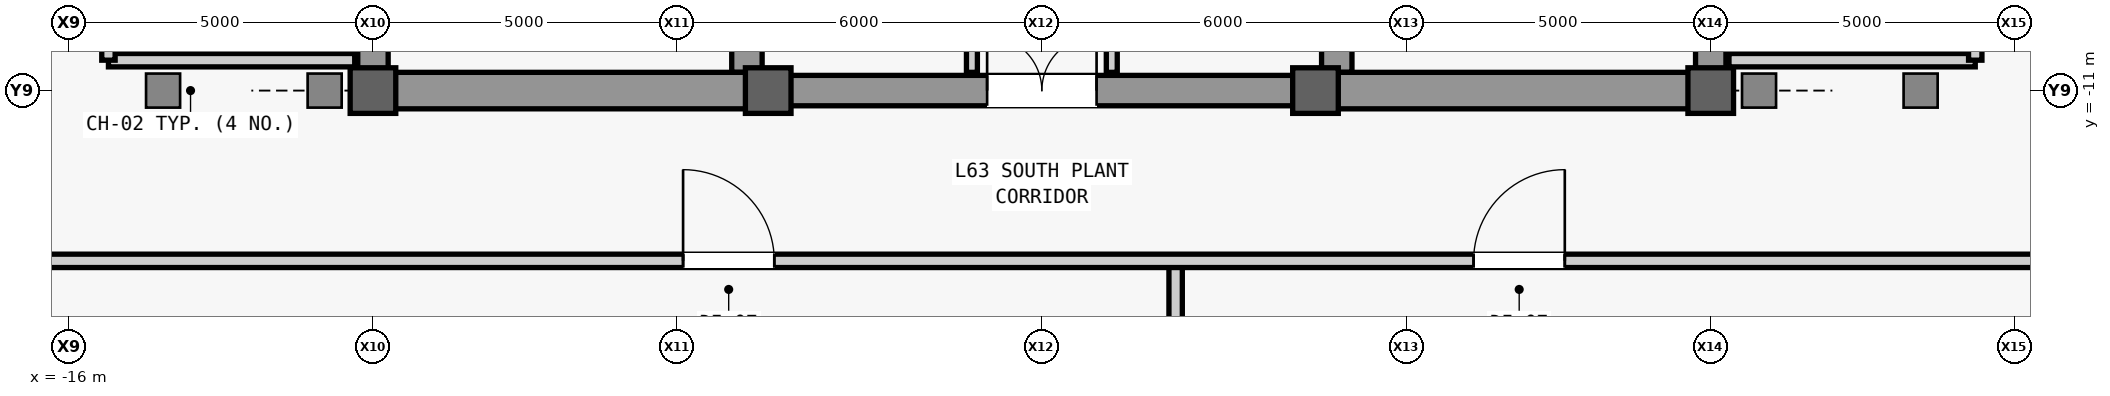
"""IFC4 building model, lengths in metres.
Left out: names, types, materials, properties, quantities, classifications, styles, units other than length and angle.
Written with IfcOpenShell. Run it as: python <this file> out.ifc"""

import sys

from ifc_helpers import new_model, si_unit, direction, frame, frame_2d, origin, origin_2d, place, context, subcontext, project, spatial, rectangle, extrude, source, transform, mapped, element, fill, save


model = new_model("IFC4")
c1 = context("Model", 3, precision=1e-05, world=origin(), true_north=direction((0.0, 1.0)))
c2 = subcontext(c1, "Body", "Model", "MODEL_VIEW")
j1 = project(units=[si_unit("LENGTHUNIT", "METRE"), si_unit("PLANEANGLEUNIT", "RADIAN")], contexts=[c1])
p1 = place(None, origin())
s1 = spatial("IfcSite", under=j1, at=p1, CompositionType="ELEMENT")
p2 = place(p1, origin())
s2 = spatial("IfcBuilding", under=s1, at=p2, CompositionType="ELEMENT")
p3 = place(p2, frame((0.0, 0.0, 268.3)))
s3 = spatial("IfcBuildingStorey", under=s2, at=p3, CompositionType="ELEMENT", Elevation=268.3)
m1 = source(origin(), c2, "Body", "SweptSolid", [
    extrude(rectangle(XDim=22.0, YDim=0.5, at=frame_2d((11.0, 0.0))), origin(), (0.0, 0.0, 1.0), 4.98),
])
p4 = place(p3, frame((-11.0, -11.0, 0.0), z_axis=(0.0, 0.0, 1.0), x_axis=(0.0, 1.0, 0.0)))
e1 = element("IfcWall", 1, at=p4, inside=s3, PredefinedType="SHEAR", context=c2, shape_type="MappedRepresentation", body=[
    mapped(m1, transform((0.0, 0.0, 0.0), scale=1.0)),
])
m2 = source(origin(), c2, "Body", "SweptSolid", [
    extrude(rectangle(XDim=1.1, YDim=2.2, at=frame_2d((0.55, 1.1))), frame((0.0, 0.26, 0.0), z_axis=(0.0, -1.0, 0.0), x_axis=(1.0, 0.0, 0.0)), (0.0, 0.0, 1.0), 0.52),
])
p5 = place(p4, frame((0.8, 0.0, 0.0)))
e2 = element("IfcOpeningElement", 2, at=p5, cuts=e1, PredefinedType="OPENING", context=c2, shape_type="MappedRepresentation", body=[
    mapped(m2, transform((0.0, 0.0, 0.0), scale=1.0)),
])
p6 = place(p4, frame((12.5, 0.0, 0.0)))
e3 = element("IfcOpeningElement", 3, at=p6, cuts=e1, PredefinedType="OPENING", context=c2, shape_type="MappedRepresentation", body=[
    mapped(m2, transform((0.0, 0.0, 0.0), scale=1.0)),
])
m3 = source(origin(), c2, "Body", "SweptSolid", [
    extrude(rectangle(XDim=0.9, YDim=2.15, at=frame_2d((0.45, 1.075))), frame((0.0, 0.26, 0.0), z_axis=(0.0, -1.0, 0.0), x_axis=(1.0, 0.0, 0.0)), (0.0, 0.0, 1.0), 0.52),
])
p7 = place(p4, frame((7.575, 0.0, 0.0)))
e4 = element("IfcOpeningElement", 4, at=p7, cuts=e1, PredefinedType="OPENING", context=c2, shape_type="MappedRepresentation", body=[
    mapped(m3, transform((0.0, 0.0, 0.0), scale=1.0)),
])
m4 = source(origin(), c2, "Body", "SweptSolid", [
    extrude(rectangle(XDim=1.3, YDim=2.3, at=frame_2d((0.65, 1.15))), frame((0.0, 0.26, 0.0), z_axis=(0.0, -1.0, 0.0), x_axis=(1.0, 0.0, 0.0)), (0.0, 0.0, 1.0), 0.52),
])
p8 = place(p4, frame((2.7, 0.0, 0.0)))
e5 = element("IfcOpeningElement", 5, at=p8, cuts=e1, PredefinedType="OPENING", context=c2, shape_type="MappedRepresentation", body=[
    mapped(m4, transform((0.0, 0.0, 0.0), scale=1.0)),
])
p9 = place(p3, frame((11.0, -11.0, 0.0), z_axis=(0.0, 0.0, 1.0), x_axis=(0.0, 1.0, 0.0)))
e6 = element("IfcWall", 6, at=p9, inside=s3, PredefinedType="SHEAR", context=c2, shape_type="MappedRepresentation", body=[
    mapped(m1, transform((0.0, 0.0, 0.0), scale=1.0)),
])
p10 = place(p9, frame((0.8, 0.0, 0.0)))
e7 = element("IfcOpeningElement", 7, at=p10, cuts=e6, PredefinedType="OPENING", context=c2, shape_type="MappedRepresentation", body=[
    mapped(m2, transform((0.0, 0.0, 0.0), scale=1.0)),
])
p11 = place(p9, frame((7.575, 0.0, 0.0)))
e8 = element("IfcOpeningElement", 8, at=p11, cuts=e6, PredefinedType="OPENING", context=c2, shape_type="MappedRepresentation", body=[
    mapped(m3, transform((0.0, 0.0, 0.0), scale=1.0)),
])
p12 = place(p9, frame((2.7, 0.0, 0.0)))
e9 = element("IfcOpeningElement", 9, at=p12, cuts=e6, PredefinedType="OPENING", context=c2, shape_type="MappedRepresentation", body=[
    mapped(m4, transform((0.0, 0.0, 0.0), scale=1.0)),
])
p13 = place(p9, frame((13.35, 0.0, 0.0)))
e10 = element("IfcOpeningElement", 10, at=p13, cuts=e6, PredefinedType="OPENING", context=c2, shape_type="MappedRepresentation", body=[
    mapped(m4, transform((0.0, 0.0, 0.0), scale=1.0)),
])
m5 = source(origin(), c2, "Body", "SweptSolid", [
    extrude(rectangle(XDim=21.4, YDim=0.5, at=frame_2d((10.7, 0.0))), origin(), (0.0, 0.0, 1.0), 4.98),
])
for number, where, z_axis, x_axis in (
    (11, (-4.85, -10.7, 0.0), (0.0, 0.0, 1.0), (0.0, 1.0, 0.0)),
    (12, (4.85, -10.7, 0.0), (0.0, 0.0, 1.0), (0.0, 1.0, 0.0)),
):
    element("IfcWall", number, at=place(p3, frame(where, z_axis=z_axis, x_axis=x_axis)), inside=s3, PredefinedType="SHEAR", context=c2, shape_type="MappedRepresentation", body=[
        mapped(m5, transform((0.0, 0.0, 0.0), scale=1.0)),
    ])
m6 = source(origin(), c2, "Body", "SweptSolid", [
    extrude(rectangle(XDim=5.9, YDim=0.6, at=frame_2d((2.95, 0.0))), origin(), (0.0, 0.0, 1.0), 4.98),
])
for number, where, z_axis, x_axis in (
    (13, (-10.75, -11.0, 0.0), (0.0, 0.0, 1.0), (1.0, 0.0, 0.0)),
    (14, (4.85, -11.0, 0.0), (0.0, 0.0, 1.0), (1.0, 0.0, 0.0)),
):
    element("IfcWall", number, at=place(p3, frame(where, z_axis=z_axis, x_axis=x_axis)), inside=s3, PredefinedType="SHEAR", context=c2, shape_type="MappedRepresentation", body=[
        mapped(m6, transform((0.0, 0.0, 0.0), scale=1.0)),
    ])
m7 = source(origin(), c2, "Body", "SweptSolid", [
    extrude(rectangle(XDim=9.2, YDim=0.5, at=frame_2d((4.6, 0.0))), origin(), (0.0, 0.0, 1.0), 4.98),
])
p14 = place(p3, frame((-4.6, -11.0, 0.0), z_axis=(0.0, 0.0, 1.0), x_axis=(1.0, 0.0, 0.0)))
e15 = element("IfcWall", 15, at=p14, inside=s3, PredefinedType="SHEAR", context=c2, shape_type="MappedRepresentation", body=[
    mapped(m7, transform((0.0, 0.0, 0.0), scale=1.0)),
])
m8 = source(origin(), c2, "Body", "SweptSolid", [
    extrude(rectangle(XDim=1.8, YDim=2.25, at=frame_2d((0.9, 1.125))), frame((0.0, 0.26, 0.0), z_axis=(0.0, -1.0, 0.0), x_axis=(1.0, 0.0, 0.0)), (0.0, 0.0, 1.0), 0.52),
])
p15 = place(p14, frame((3.7, 0.0, 0.0)))
e16 = element("IfcOpeningElement", 16, at=p15, cuts=e15, PredefinedType="OPENING", context=c2, shape_type="MappedRepresentation", body=[
    mapped(m8, transform((0.0, 0.0, 0.0), scale=1.0)),
])
m9 = source(origin(), c2, "Body", "SweptSolid", [
    extrude(rectangle(XDim=0.75, YDim=0.75, at=origin_2d()), origin(), (0.0, 0.0, 1.0), 5.2),
])
for number, where, z_axis, x_axis in (
    (17, (-11.0, -11.0, 0.0), (0.0, 0.0, 1.0), (1.0, 0.0, 0.0)),
    (18, (-4.5, -11.0, 0.0), (0.0, 0.0, 1.0), (1.0, 0.0, 0.0)),
    (19, (4.5, -11.0, 0.0), (0.0, 0.0, 1.0), (1.0, 0.0, 0.0)),
    (20, (11.0, -11.0, 0.0), (0.0, 0.0, 1.0), (1.0, 0.0, 0.0)),
):
    element("IfcColumn", number, at=place(p3, frame(where, z_axis=z_axis, x_axis=x_axis)), inside=s3, PredefinedType="COLUMN", context=c2, shape_type="MappedRepresentation", body=[
        mapped(m9, transform((0.0, 0.0, 0.0), scale=1.0)),
    ])
m10 = source(origin(), c2, "Body", "SweptSolid", [
    extrude(rectangle(XDim=4.05, YDim=0.22, at=frame_2d((2.025, 0.0))), origin(), (0.0, 0.0, 1.0), 4.98),
])
p16 = place(p3, frame((-15.35, -10.5, 0.0), z_axis=(0.0, 0.0, 1.0), x_axis=(1.0, 0.0, 0.0)))
e21 = element("IfcWall", 21, at=p16, inside=s3, PredefinedType="PARTITIONING", context=c2, shape_type="MappedRepresentation", body=[
    mapped(m10, transform((0.0, 0.0, 0.0), scale=1.0)),
])
m11 = source(origin(), c2, "Body", "SweptSolid", [
    extrude(rectangle(XDim=4.4, YDim=0.22, at=frame_2d((2.2, 0.0))), origin(), (0.0, 0.0, 1.0), 4.98),
])
p17 = place(p3, frame((-15.35, -10.5, 0.0), z_axis=(0.0, 0.0, 1.0), x_axis=(0.0, 1.0, 0.0)))
e22 = element("IfcWall", 22, at=p17, inside=s3, PredefinedType="PARTITIONING", context=c2, shape_type="MappedRepresentation", body=[
    mapped(m11, transform((0.0, 0.0, 0.0), scale=1.0)),
])
m12 = source(origin(), c2, "Body", "SweptSolid", [
    extrude(rectangle(XDim=1.2, YDim=2.2, at=frame_2d((0.6, 1.1))), frame((0.0, 0.12, 0.0), z_axis=(0.0, -1.0, 0.0), x_axis=(1.0, 0.0, 0.0)), (0.0, 0.0, 1.0), 0.24),
])
p18 = place(p17, frame((1.6, 0.0, 0.0)))
e23 = element("IfcOpeningElement", 23, at=p18, cuts=e22, PredefinedType="OPENING", context=c2, shape_type="MappedRepresentation", body=[
    mapped(m12, transform((0.0, 0.0, 0.0), scale=1.0)),
])
p19 = place(p3, frame((11.3, -10.5, 0.0), z_axis=(0.0, 0.0, 1.0), x_axis=(1.0, 0.0, 0.0)))
e24 = element("IfcWall", 24, at=p19, inside=s3, PredefinedType="PARTITIONING", context=c2, shape_type="MappedRepresentation", body=[
    mapped(m10, transform((0.0, 0.0, 0.0), scale=1.0)),
])
p20 = place(p3, frame((15.35, -10.5, 0.0), z_axis=(0.0, 0.0, 1.0), x_axis=(0.0, 1.0, 0.0)))
e25 = element("IfcWall", 25, at=p20, inside=s3, PredefinedType="PARTITIONING", context=c2, shape_type="MappedRepresentation", body=[
    mapped(m11, transform((0.0, 0.0, 0.0), scale=1.0)),
])
p21 = place(p20, frame((1.6, 0.0, 0.0)))
e26 = element("IfcOpeningElement", 26, at=p21, cuts=e25, PredefinedType="OPENING", context=c2, shape_type="MappedRepresentation", body=[
    mapped(m12, transform((0.0, 0.0, 0.0), scale=1.0)),
])
m13 = source(origin(), c2, "Body", "SweptSolid", [
    extrude(rectangle(XDim=5.4, YDim=0.18, at=frame_2d((2.7, 0.0))), origin(), (0.0, 0.0, 1.0), 4.98),
])
p22 = place(p3, frame((-1.15, -10.7, 0.0), z_axis=(0.0, 0.0, 1.0), x_axis=(0.0, 1.0, 0.0)))
e27 = element("IfcWall", 27, at=p22, inside=s3, PredefinedType="PARTITIONING", context=c2, shape_type="MappedRepresentation", body=[
    mapped(m13, transform((0.0, 0.0, 0.0), scale=1.0)),
])
m14 = source(origin(), c2, "Body", "SweptSolid", [
    extrude(rectangle(XDim=0.9, YDim=2.15, at=frame_2d((0.45, 1.075))), frame((0.0, 0.1, 0.0), z_axis=(0.0, -1.0, 0.0), x_axis=(1.0, 0.0, 0.0)), (0.0, 0.0, 1.0), 0.2),
])
p23 = place(p22, frame((1.15, 0.0, 0.0)))
e28 = element("IfcOpeningElement", 28, at=p23, cuts=e27, PredefinedType="OPENING", context=c2, shape_type="MappedRepresentation", body=[
    mapped(m14, transform((0.0, 0.0, 0.0), scale=1.0)),
])
p24 = place(p22, frame((3.85, 0.0, 0.0)))
e29 = element("IfcOpeningElement", 29, at=p24, cuts=e27, PredefinedType="OPENING", context=c2, shape_type="MappedRepresentation", body=[
    mapped(m14, transform((0.0, 0.0, 0.0), scale=1.0)),
])
p25 = place(p3, frame((1.15, -10.7, 0.0), z_axis=(0.0, 0.0, 1.0), x_axis=(0.0, 1.0, 0.0)))
e30 = element("IfcWall", 30, at=p25, inside=s3, PredefinedType="PARTITIONING", context=c2, shape_type="MappedRepresentation", body=[
    mapped(m13, transform((0.0, 0.0, 0.0), scale=1.0)),
])
p26 = place(p25, frame((2.25, 0.0, 0.0)))
e31 = element("IfcOpeningElement", 31, at=p26, cuts=e30, PredefinedType="OPENING", context=c2, shape_type="MappedRepresentation", body=[
    mapped(m14, transform((0.0, 0.0, 0.0), scale=1.0)),
])
m15 = source(origin(), c2, "Body", "SweptSolid", [
    extrude(rectangle(XDim=14.2, YDim=0.22, at=frame_2d((7.1, 0.0))), origin(), (0.0, 0.0, 1.0), 4.98),
])
p27 = place(p3, frame((2.2, -28.0, 0.0), z_axis=(0.0, 0.0, 1.0), x_axis=(0.0, 1.0, 0.0)))
e32 = element("IfcWall", 32, at=p27, inside=s3, PredefinedType="PARTITIONING", context=c2, shape_type="MappedRepresentation", body=[
    mapped(m15, transform((0.0, 0.0, 0.0), scale=1.0)),
])
m16 = source(origin(), c2, "Body", "SweptSolid", [
    extrude(rectangle(XDim=45.0, YDim=0.22, at=frame_2d((22.5, 0.0))), origin(), (0.0, 0.0, 1.0), 4.98),
])
p28 = place(p3, frame((-22.5, -13.8, 0.0), z_axis=(0.0, 0.0, 1.0), x_axis=(1.0, 0.0, 0.0)))
e33 = element("IfcWall", 33, at=p28, inside=s3, PredefinedType="PARTITIONING", context=c2, shape_type="MappedRepresentation", body=[
    mapped(m16, transform((0.0, 0.0, 0.0), scale=1.0)),
])
m17 = source(origin(), c2, "Body", "SweptSolid", [
    extrude(rectangle(XDim=1.5, YDim=2.3, at=frame_2d((0.75, 1.15))), frame((0.0, 0.12, 0.0), z_axis=(0.0, -1.0, 0.0), x_axis=(1.0, 0.0, 0.0)), (0.0, 0.0, 1.0), 0.24),
])
p29 = place(p28, frame((16.6, 0.0, 0.0)))
e34 = element("IfcOpeningElement", 34, at=p29, cuts=e33, PredefinedType="OPENING", context=c2, shape_type="MappedRepresentation", body=[
    mapped(m17, transform((0.0, 0.0, 0.0), scale=1.0)),
])
p30 = place(p28, frame((29.6, 0.0, 0.0)))
e35 = element("IfcOpeningElement", 35, at=p30, cuts=e33, PredefinedType="OPENING", context=c2, shape_type="MappedRepresentation", body=[
    mapped(m17, transform((0.0, 0.0, 0.0), scale=1.0)),
])
m18 = source(origin(), c2, "Body", "SweptSolid", [
    extrude(rectangle(XDim=1.8, YDim=2.25, at=frame_2d((0.9, 1.125))), frame((0.0, 0.025, 0.0), z_axis=(0.0, -1.0, 0.0), x_axis=(1.0, 0.0, 0.0)), (0.0, 0.0, 1.0), 0.05),
])
p31 = place(p15, origin())
e36 = element("IfcDoor", 36, at=p31, inside=s3, OperationType="SINGLE_SWING_LEFT", PredefinedType="DOOR", context=c2, shape_type="MappedRepresentation", body=[
    mapped(m18, transform((0.0, 0.0, 0.0), scale=1.0)),
])
fill(e16, e36)
m19 = source(origin(), c2, "Body", "SweptSolid", [
    extrude(rectangle(XDim=1.5, YDim=2.3, at=frame_2d((0.75, 1.15))), frame((0.0, 0.025, 0.0), z_axis=(0.0, -1.0, 0.0), x_axis=(1.0, 0.0, 0.0)), (0.0, 0.0, 1.0), 0.05),
])
p32 = place(p29, origin())
e37 = element("IfcDoor", 37, at=p32, inside=s3, OperationType="SINGLE_SWING_LEFT", PredefinedType="DOOR", context=c2, shape_type="MappedRepresentation", body=[
    mapped(m19, transform((0.0, 0.0, 0.0), scale=1.0)),
])
fill(e34, e37)
p33 = place(p30, origin())
e38 = element("IfcDoor", 38, at=p33, inside=s3, OperationType="SINGLE_SWING_RIGHT", PredefinedType="DOOR", context=c2, shape_type="MappedRepresentation", body=[
    mapped(m19, transform((0.0, 0.0, 0.0), scale=1.0)),
])
fill(e35, e38)
save(model, sys.argv[1])
